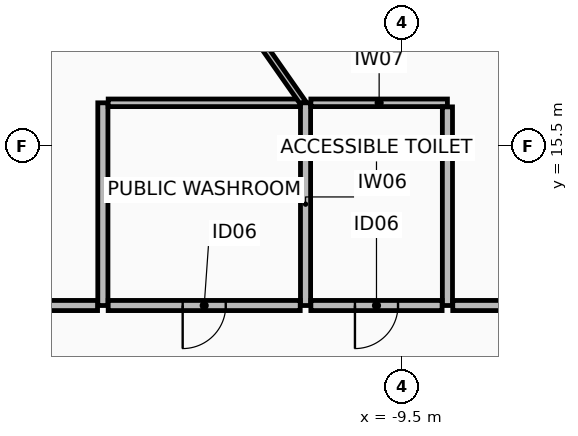
"""IFC4 building model, lengths in metres.
Left out: names, types, materials, properties, quantities, classifications, styles, units other than length and angle.
Written with IfcOpenShell. Run it as: python <this file> out.ifc"""

import sys

from ifc_helpers import new_model, si_unit, direction, frame, frame_2d, origin, place, context, subcontext, project, spatial, rectangle, extrude, element, fill, save


model = new_model("IFC4")
c1 = context("Model", 3, precision=1e-05, world=origin(), true_north=direction((0.0, 1.0)))
c2 = subcontext(c1, "Body", "Model", "MODEL_VIEW")
j1 = project(units=[si_unit("LENGTHUNIT", "METRE"), si_unit("PLANEANGLEUNIT", "RADIAN")], contexts=[c1])
p1 = place(None, origin())
s1 = spatial("IfcSite", under=j1, at=p1, CompositionType="ELEMENT")
p2 = place(p1, origin())
s2 = spatial("IfcBuilding", under=s1, at=p2, CompositionType="ELEMENT")
p3 = place(p2, origin())
s3 = spatial("IfcBuildingStorey", under=s2, at=p3, CompositionType="ELEMENT", Elevation=0.0)
p4 = place(p3, frame((-11.4, 12.35, 0.0), z_axis=(0.0, 0.0, 1.0), x_axis=(0.0, 1.0, 0.0)))
e1 = element("IfcWall", 1, at=p4, inside=s3, PredefinedType="PARTITIONING", context=c2, shape_type="SweptSolid", body=[
    extrude(rectangle(XDim=4.0, YDim=0.2, at=frame_2d((2.0, 0.0))), origin(), (0.0, 0.0, 1.0), 4.765),
])
p5 = place(p3, frame((-11.295, 16.35, 0.0), z_axis=(0.0, 0.0, 1.0), x_axis=(1.0, 0.0, 0.0)))
e2 = element("IfcWall", 2, at=p5, inside=s3, PredefinedType="PARTITIONING", context=c2, shape_type="SweptSolid", body=[
    extrude(rectangle(XDim=2.695, YDim=0.15, at=frame_2d((1.347, 0.0))), origin(), (0.0, 0.0, 1.0), 4.565),
])
p6 = place(p3, frame((-8.6, 16.27, 0.0), z_axis=(0.0, 0.0, 1.0), x_axis=(0.0, -1.0, 0.0)))
e3 = element("IfcWall", 3, at=p6, inside=s3, PredefinedType="PARTITIONING", context=c2, shape_type="SweptSolid", body=[
    extrude(rectangle(XDim=3.92, YDim=0.2, at=frame_2d((1.96, 0.0))), origin(), (0.0, 0.0, 1.0), 4.765),
])
p7 = place(p3, frame((-8.705, 12.35, 0.0), z_axis=(0.0, 0.0, 1.0), x_axis=(-1.0, 0.0, 0.0)))
e4 = element("IfcWall", 4, at=p7, inside=s3, PredefinedType="PARTITIONING", context=c2, shape_type="SweptSolid", body=[
    extrude(rectangle(XDim=2.59, YDim=0.2, at=frame_2d((1.295, 0.0))), origin(), (0.0, 0.0, 1.0), 4.565),
])
p8 = place(p7, frame((0.87, 0.0, 0.0)))
e5 = element("IfcOpeningElement", 5, at=p8, cuts=e4, PredefinedType="OPENING", context=c2, shape_type="SweptSolid", body=[
    extrude(rectangle(XDim=0.85, YDim=2.1, at=frame_2d((0.425, 1.05))), frame((0.0, 0.11, 0.0), z_axis=(0.0, -1.0, 0.0), x_axis=(1.0, 0.0, 0.0)), (0.0, 0.0, 1.0), 0.22),
])
p9 = place(p3, frame((-15.4, 12.35, 0.0), z_axis=(0.0, 0.0, 1.0), x_axis=(0.0, 1.0, 0.0)))
e6 = element("IfcWall", 6, at=p9, inside=s3, PredefinedType="PARTITIONING", context=c2, shape_type="SweptSolid", body=[
    extrude(rectangle(XDim=4.0, YDim=0.2, at=frame_2d((2.0, 0.0))), origin(), (0.0, 0.0, 1.0), 4.765),
])
p10 = place(p3, frame((-15.295, 16.35, 0.0), z_axis=(0.0, 0.0, 1.0), x_axis=(1.0, 0.0, 0.0)))
e7 = element("IfcWall", 7, at=p10, inside=s3, PredefinedType="PARTITIONING", context=c2, shape_type="SweptSolid", body=[
    extrude(rectangle(XDim=3.79, YDim=0.15, at=frame_2d((1.895, 0.0))), origin(), (0.0, 0.0, 1.0), 5.22),
])
p11 = place(p3, frame((-11.505, 12.35, 0.0), z_axis=(0.0, 0.0, 1.0), x_axis=(-1.0, 0.0, 0.0)))
e8 = element("IfcWall", 8, at=p11, inside=s3, PredefinedType="PARTITIONING", context=c2, shape_type="SweptSolid", body=[
    extrude(rectangle(XDim=3.79, YDim=0.2, at=frame_2d((1.895, 0.0))), origin(), (0.0, 0.0, 1.0), 5.22),
])
p12 = place(p11, frame((1.47, 0.0, 0.0)))
e9 = element("IfcOpeningElement", 9, at=p12, cuts=e8, PredefinedType="OPENING", context=c2, shape_type="SweptSolid", body=[
    extrude(rectangle(XDim=0.85, YDim=2.1, at=frame_2d((0.425, 1.05))), frame((0.0, 0.11, 0.0), z_axis=(0.0, -1.0, 0.0), x_axis=(1.0, 0.0, 0.0)), (0.0, 0.0, 1.0), 0.22),
])
p13 = place(p3, frame((-11.456, 16.361, 0.0), z_axis=(0.0, 0.0, 1.0), x_axis=(-0.573581089452, 0.819148786133, 0.0)))
e10 = element("IfcWall", 10, at=p13, inside=s3, PredefinedType="PARTITIONING", context=c2, shape_type="SweptSolid", body=[
    extrude(rectangle(XDim=12.28, YDim=0.12, at=frame_2d((6.14, 0.0))), origin(), (0.0, 0.0, 1.0), 4.315),
])
p14 = place(p3, frame((3.29, 12.35, 0.0), z_axis=(0.0, 0.0, 1.0), x_axis=(-1.0, 0.0, 0.0)))
e11 = element("IfcWall", 11, at=p14, inside=s3, PredefinedType="PARTITIONING", context=c2, shape_type="SweptSolid", body=[
    extrude(rectangle(XDim=11.785, YDim=0.2, at=frame_2d((5.893, 0.0))), origin(), (0.0, 0.0, 1.0), 4.565),
])
p15 = place(p14, frame((5.442, 0.0, 0.0)))
e12 = element("IfcOpeningElement", 12, at=p15, cuts=e11, PredefinedType="OPENING", context=c2, shape_type="SweptSolid", body=[
    extrude(rectangle(XDim=0.9, YDim=2.1, at=frame_2d((0.45, 1.05))), frame((0.0, 0.11, 0.0), z_axis=(0.0, -1.0, 0.0), x_axis=(1.0, 0.0, 0.0)), (0.0, 0.0, 1.0), 0.22),
])
p16 = place(p3, frame((-15.505, 12.35, 0.0), z_axis=(0.0, 0.0, 1.0), x_axis=(-1.0, 0.0, 0.0)))
e13 = element("IfcWall", 13, at=p16, inside=s3, PredefinedType="PARTITIONING", context=c2, shape_type="SweptSolid", body=[
    extrude(rectangle(XDim=2.044, YDim=0.2, at=frame_2d((1.022, 0.0))), origin(), (0.0, 0.0, 1.0), 4.565),
])
p17 = place(p8, frame((0.85, 0.0, 0.0), z_axis=(0.0, 0.0, 1.0), x_axis=(-1.0, 0.0, 0.0)))
e14 = element("IfcDoor", 14, at=p17, inside=s3, OperationType="SINGLE_SWING_RIGHT", PredefinedType="DOOR", context=c2, shape_type="SweptSolid", body=[
    extrude(rectangle(XDim=0.85, YDim=2.1, at=frame_2d((0.425, 1.05))), frame((0.0, 0.025, 0.0), z_axis=(0.0, -1.0, 0.0), x_axis=(1.0, 0.0, 0.0)), (0.0, 0.0, 1.0), 0.05),
])
fill(e5, e14)
p18 = place(p12, frame((0.85, 0.0, 0.0), z_axis=(0.0, 0.0, 1.0), x_axis=(-1.0, 0.0, 0.0)))
e15 = element("IfcDoor", 15, at=p18, inside=s3, OperationType="SINGLE_SWING_RIGHT", PredefinedType="DOOR", context=c2, shape_type="SweptSolid", body=[
    extrude(rectangle(XDim=0.85, YDim=2.1, at=frame_2d((0.425, 1.05))), frame((0.0, 0.025, 0.0), z_axis=(0.0, -1.0, 0.0), x_axis=(1.0, 0.0, 0.0)), (0.0, 0.0, 1.0), 0.05),
])
fill(e9, e15)
save(model, sys.argv[1])
